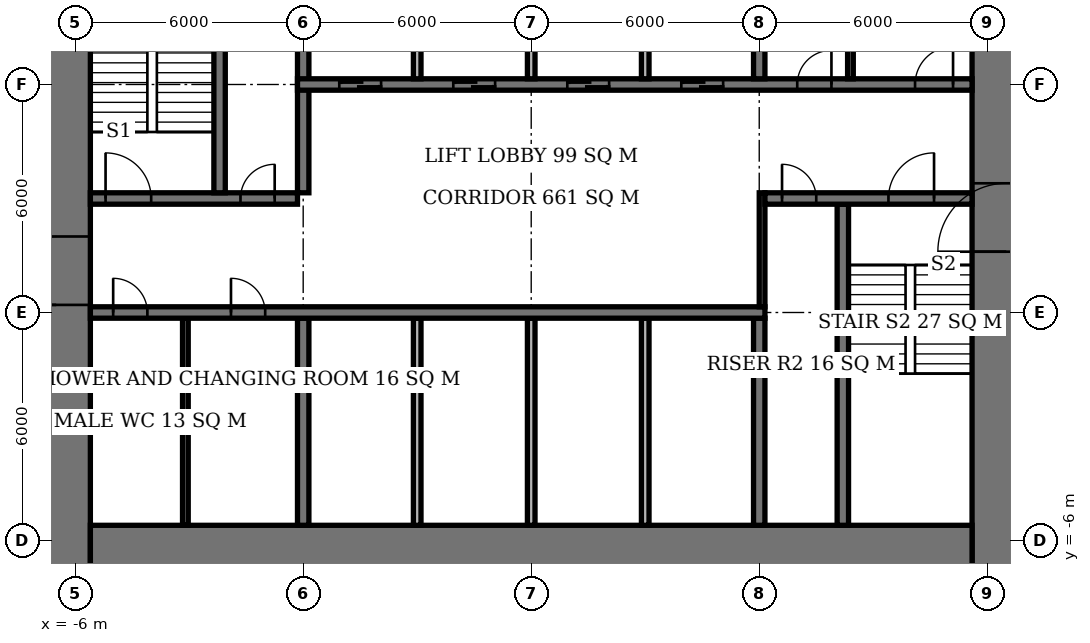
"""IFC4 building model, lengths in metres.
Left out: names, types, materials, properties, quantities, classifications, styles, units other than length and angle.
Written with IfcOpenShell. Run it as: python <this file> out.ifc"""

import sys

from ifc_helpers import new_model, si_unit, direction, frame, frame_2d, origin, place, context, subcontext, project, spatial, rectangle, extrude, element, fill, save


model = new_model("IFC4")
c1 = context("Model", 3, precision=1e-05, world=origin(), true_north=direction((0.0, 1.0)))
c2 = subcontext(c1, "Body", "Model", "MODEL_VIEW")
j1 = project(units=[si_unit("LENGTHUNIT", "METRE"), si_unit("PLANEANGLEUNIT", "RADIAN")], contexts=[c1])
p1 = place(None, origin())
s1 = spatial("IfcSite", under=j1, at=p1, CompositionType="ELEMENT")
p2 = place(p1, origin())
s2 = spatial("IfcBuilding", under=s1, at=p2, CompositionType="ELEMENT")
p3 = place(p2, frame((0.0, 0.0, 41.6)))
s3 = spatial("IfcBuildingStorey", under=s2, at=p3, CompositionType="ELEMENT", Elevation=41.6)
p4 = place(p3, frame((-5.6, -6.6, 0.0), z_axis=(0.0, 0.0, 1.0), x_axis=(1.0, 0.0, 0.0)))
e1 = element("IfcWall", 1, at=p4, inside=s3, PredefinedType="SHEAR", context=c2, shape_type="SweptSolid", body=[
    extrude(rectangle(XDim=23.2, YDim=2.0, at=frame_2d((11.6, 0.0))), origin(), (0.0, 0.0, 1.0), 3.9),
])
p5 = place(p3, frame((-6.5, -7.6, 0.0), z_axis=(0.0, 0.0, 1.0), x_axis=(0.0, 1.0, 0.0)))
e2 = element("IfcWall", 2, at=p5, inside=s3, PredefinedType="SHEAR", context=c2, shape_type="SweptSolid", body=[
    extrude(rectangle(XDim=21.2, YDim=1.8, at=frame_2d((10.6, 0.0))), origin(), (0.0, 0.0, 1.0), 3.9),
])
p6 = place(p5, frame((7.8, 0.0, 0.0)))
e3 = element("IfcOpeningElement", 3, at=p6, cuts=e2, PredefinedType="OPENING", context=c2, shape_type="SweptSolid", body=[
    extrude(rectangle(XDim=1.8, YDim=2.4, at=frame_2d((0.9, 1.2))), frame((0.0, 0.91, 0.0), z_axis=(0.0, -1.0, 0.0), x_axis=(1.0, 0.0, 0.0)), (0.0, 0.0, 1.0), 1.82),
])
p7 = place(p3, frame((18.5, -7.6, 0.0), z_axis=(0.0, 0.0, 1.0), x_axis=(0.0, 1.0, 0.0)))
e4 = element("IfcWall", 4, at=p7, inside=s3, PredefinedType="SHEAR", context=c2, shape_type="SweptSolid", body=[
    extrude(rectangle(XDim=21.2, YDim=1.8, at=frame_2d((10.6, 0.0))), origin(), (0.0, 0.0, 1.0), 3.9),
])
p8 = place(p7, frame((9.2, 0.0, 0.0)))
e5 = element("IfcOpeningElement", 5, at=p8, cuts=e4, PredefinedType="OPENING", context=c2, shape_type="SweptSolid", body=[
    extrude(rectangle(XDim=1.8, YDim=2.4, at=frame_2d((0.9, 1.2))), frame((0.0, 0.91, 0.0), z_axis=(0.0, -1.0, 0.0), x_axis=(1.0, 0.0, 0.0)), (0.0, 0.0, 1.0), 1.82),
])
p9 = place(p3, frame((-5.6, 0.0, 0.0), z_axis=(0.0, 0.0, 1.0), x_axis=(1.0, 0.0, 0.0)))
e6 = element("IfcWall", 6, at=p9, inside=s3, PredefinedType="SHEAR", context=c2, shape_type="SweptSolid", body=[
    extrude(rectangle(XDim=17.75, YDim=0.3, at=frame_2d((8.875, 0.0))), origin(), (0.0, 0.0, 1.0), 3.9),
])
p10 = place(p9, frame((0.6, 0.0, 0.0)))
e7 = element("IfcOpeningElement", 7, at=p10, cuts=e6, PredefinedType="OPENING", context=c2, shape_type="SweptSolid", body=[
    extrude(rectangle(XDim=0.9, YDim=2.1, at=frame_2d((0.45, 1.05))), frame((0.0, 0.16, 0.0), z_axis=(0.0, -1.0, 0.0), x_axis=(1.0, 0.0, 0.0)), (0.0, 0.0, 1.0), 0.32),
])
p11 = place(p9, frame((3.7, 0.0, 0.0)))
e8 = element("IfcOpeningElement", 8, at=p11, cuts=e6, PredefinedType="OPENING", context=c2, shape_type="SweptSolid", body=[
    extrude(rectangle(XDim=0.9, YDim=2.1, at=frame_2d((0.45, 1.05))), frame((0.0, 0.16, 0.0), z_axis=(0.0, -1.0, 0.0), x_axis=(1.0, 0.0, 0.0)), (0.0, 0.0, 1.0), 0.32),
])
p12 = place(p3, frame((-5.6, 3.0, 0.0), z_axis=(0.0, 0.0, 1.0), x_axis=(1.0, 0.0, 0.0)))
e9 = element("IfcWall", 9, at=p12, inside=s3, PredefinedType="SHEAR", context=c2, shape_type="SweptSolid", body=[
    extrude(rectangle(XDim=5.45, YDim=0.3, at=frame_2d((2.725, 0.0))), origin(), (0.0, 0.0, 1.0), 3.9),
])
p13 = place(p12, frame((0.4, 0.0, 0.0)))
e10 = element("IfcOpeningElement", 10, at=p13, cuts=e9, PredefinedType="OPENING", context=c2, shape_type="SweptSolid", body=[
    extrude(rectangle(XDim=1.2, YDim=2.1, at=frame_2d((0.6, 1.05))), frame((0.0, 0.16, 0.0), z_axis=(0.0, -1.0, 0.0), x_axis=(1.0, 0.0, 0.0)), (0.0, 0.0, 1.0), 0.32),
])
p14 = place(p12, frame((3.95, 0.0, 0.0)))
e11 = element("IfcOpeningElement", 11, at=p14, cuts=e9, PredefinedType="OPENING", context=c2, shape_type="SweptSolid", body=[
    extrude(rectangle(XDim=0.9, YDim=2.1, at=frame_2d((0.45, 1.05))), frame((0.0, 0.16, 0.0), z_axis=(0.0, -1.0, 0.0), x_axis=(1.0, 0.0, 0.0)), (0.0, 0.0, 1.0), 0.32),
])
p15 = place(p3, frame((12.15, 3.0, 0.0), z_axis=(0.0, 0.0, 1.0), x_axis=(1.0, 0.0, 0.0)))
e12 = element("IfcWall", 12, at=p15, inside=s3, PredefinedType="SHEAR", context=c2, shape_type="SweptSolid", body=[
    extrude(rectangle(XDim=5.45, YDim=0.3, at=frame_2d((2.725, 0.0))), origin(), (0.0, 0.0, 1.0), 3.9),
])
p16 = place(p15, frame((3.25, 0.0, 0.0)))
e13 = element("IfcOpeningElement", 13, at=p16, cuts=e12, PredefinedType="OPENING", context=c2, shape_type="SweptSolid", body=[
    extrude(rectangle(XDim=1.2, YDim=2.1, at=frame_2d((0.6, 1.05))), frame((0.0, 0.16, 0.0), z_axis=(0.0, -1.0, 0.0), x_axis=(1.0, 0.0, 0.0)), (0.0, 0.0, 1.0), 0.32),
])
p17 = place(p15, frame((0.45, 0.0, 0.0)))
e14 = element("IfcOpeningElement", 14, at=p17, cuts=e12, PredefinedType="OPENING", context=c2, shape_type="SweptSolid", body=[
    extrude(rectangle(XDim=0.9, YDim=2.1, at=frame_2d((0.45, 1.05))), frame((0.0, 0.16, 0.0), z_axis=(0.0, -1.0, 0.0), x_axis=(1.0, 0.0, 0.0)), (0.0, 0.0, 1.0), 0.32),
])
p18 = place(p3, frame((-0.15, 6.0, 0.0), z_axis=(0.0, 0.0, 1.0), x_axis=(1.0, 0.0, 0.0)))
e15 = element("IfcWall", 15, at=p18, inside=s3, PredefinedType="SHEAR", context=c2, shape_type="SweptSolid", body=[
    extrude(rectangle(XDim=17.75, YDim=0.3, at=frame_2d((8.875, 0.0))), origin(), (0.0, 0.0, 1.0), 3.9),
])
p19 = place(p18, frame((13.15, 0.0, 0.0)))
e16 = element("IfcOpeningElement", 16, at=p19, cuts=e15, PredefinedType="OPENING", context=c2, shape_type="SweptSolid", body=[
    extrude(rectangle(XDim=0.9, YDim=2.1, at=frame_2d((0.45, 1.05))), frame((0.0, 0.16, 0.0), z_axis=(0.0, -1.0, 0.0), x_axis=(1.0, 0.0, 0.0)), (0.0, 0.0, 1.0), 0.32),
])
p20 = place(p18, frame((16.25, 0.0, 0.0)))
e17 = element("IfcOpeningElement", 17, at=p20, cuts=e15, PredefinedType="OPENING", context=c2, shape_type="SweptSolid", body=[
    extrude(rectangle(XDim=1.0, YDim=2.1, at=frame_2d((0.5, 1.05))), frame((0.0, 0.16, 0.0), z_axis=(0.0, -1.0, 0.0), x_axis=(1.0, 0.0, 0.0)), (0.0, 0.0, 1.0), 0.32),
])
p21 = place(p18, frame((1.1, 0.0, 0.0)))
e18 = element("IfcOpeningElement", 18, at=p21, cuts=e15, PredefinedType="OPENING", context=c2, shape_type="SweptSolid", body=[
    extrude(rectangle(XDim=1.1, YDim=2.1, at=frame_2d((0.55, 1.05))), frame((0.0, 0.16, 0.0), z_axis=(0.0, -1.0, 0.0), x_axis=(1.0, 0.0, 0.0)), (0.0, 0.0, 1.0), 0.32),
])
p22 = place(p18, frame((4.1, 0.0, 0.0)))
e19 = element("IfcOpeningElement", 19, at=p22, cuts=e15, PredefinedType="OPENING", context=c2, shape_type="SweptSolid", body=[
    extrude(rectangle(XDim=1.1, YDim=2.1, at=frame_2d((0.55, 1.05))), frame((0.0, 0.16, 0.0), z_axis=(0.0, -1.0, 0.0), x_axis=(1.0, 0.0, 0.0)), (0.0, 0.0, 1.0), 0.32),
])
p23 = place(p18, frame((7.1, 0.0, 0.0)))
e20 = element("IfcOpeningElement", 20, at=p23, cuts=e15, PredefinedType="OPENING", context=c2, shape_type="SweptSolid", body=[
    extrude(rectangle(XDim=1.1, YDim=2.1, at=frame_2d((0.55, 1.05))), frame((0.0, 0.16, 0.0), z_axis=(0.0, -1.0, 0.0), x_axis=(1.0, 0.0, 0.0)), (0.0, 0.0, 1.0), 0.32),
])
p24 = place(p18, frame((10.1, 0.0, 0.0)))
e21 = element("IfcOpeningElement", 21, at=p24, cuts=e15, PredefinedType="OPENING", context=c2, shape_type="SweptSolid", body=[
    extrude(rectangle(XDim=1.1, YDim=2.1, at=frame_2d((0.55, 1.05))), frame((0.0, 0.16, 0.0), z_axis=(0.0, -1.0, 0.0), x_axis=(1.0, 0.0, 0.0)), (0.0, 0.0, 1.0), 0.32),
])
p25 = place(p3, frame((0.0, -5.6, 0.0), z_axis=(0.0, 0.0, 1.0), x_axis=(0.0, 1.0, 0.0)))
e22 = element("IfcWall", 22, at=p25, inside=s3, PredefinedType="SHEAR", context=c2, shape_type="SweptSolid", body=[
    extrude(rectangle(XDim=5.45, YDim=0.3, at=frame_2d((2.725, 0.0))), origin(), (0.0, 0.0, 1.0), 3.9),
])
p26 = place(p3, frame((0.0, 3.15, 0.0), z_axis=(0.0, 0.0, 1.0), x_axis=(0.0, 1.0, 0.0)))
e23 = element("IfcWall", 23, at=p26, inside=s3, PredefinedType="SHEAR", context=c2, shape_type="SweptSolid", body=[
    extrude(rectangle(XDim=8.45, YDim=0.3, at=frame_2d((4.225, 0.0))), origin(), (0.0, 0.0, 1.0), 3.9),
])
for number, where, z_axis, x_axis in (
    (24, (12.0, -5.6, 0.0), (0.0, 0.0, 1.0), (0.0, 1.0, 0.0)),
    (25, (12.0, 6.15, 0.0), (0.0, 0.0, 1.0), (0.0, 1.0, 0.0)),
):
    element("IfcWall", number, at=place(p3, frame(where, z_axis=z_axis, x_axis=x_axis)), inside=s3, PredefinedType="SHEAR", context=c2, shape_type="SweptSolid", body=[
        extrude(rectangle(XDim=5.45, YDim=0.3, at=frame_2d((2.725, 0.0))), origin(), (0.0, 0.0, 1.0), 3.9),
    ])
for number, where, z_axis, x_axis in (
    (26, (-2.2, 3.15, 0.0), (0.0, 0.0, 1.0), (0.0, 1.0, 0.0)),
    (27, (14.2, -5.6, 0.0), (0.0, 0.0, 1.0), (0.0, 1.0, 0.0)),
):
    element("IfcWall", number, at=place(p3, frame(where, z_axis=z_axis, x_axis=x_axis)), inside=s3, PredefinedType="SHEAR", context=c2, shape_type="SweptSolid", body=[
        extrude(rectangle(XDim=8.45, YDim=0.3, at=frame_2d((4.225, 0.0))), origin(), (0.0, 0.0, 1.0), 3.9),
    ])
for number, where, z_axis, x_axis in (
    (28, (3.0, 6.15, 0.0), (0.0, 0.0, 1.0), (0.0, 1.0, 0.0)),
    (29, (6.0, 6.15, 0.0), (0.0, 0.0, 1.0), (0.0, 1.0, 0.0)),
    (30, (9.0, 6.15, 0.0), (0.0, 0.0, 1.0), (0.0, 1.0, 0.0)),
    (31, (3.0, -5.6, 0.0), (0.0, 0.0, 1.0), (0.0, 1.0, 0.0)),
    (32, (6.0, -5.6, 0.0), (0.0, 0.0, 1.0), (0.0, 1.0, 0.0)),
    (33, (9.0, -5.6, 0.0), (0.0, 0.0, 1.0), (0.0, 1.0, 0.0)),
):
    element("IfcWall", number, at=place(p3, frame(where, z_axis=z_axis, x_axis=x_axis)), inside=s3, PredefinedType="SOLIDWALL", context=c2, shape_type="SweptSolid", body=[
        extrude(rectangle(XDim=5.45, YDim=0.2, at=frame_2d((2.725, 0.0))), origin(), (0.0, 0.0, 1.0), 3.9),
    ])
for number, where, z_axis, x_axis in (
    (34, (-3.1, -5.6, 0.0), (0.0, 0.0, 1.0), (0.0, 1.0, 0.0)),
    (35, (14.4, 6.15, 0.0), (0.0, 0.0, 1.0), (0.0, 1.0, 0.0)),
):
    element("IfcWall", number, at=place(p3, frame(where, z_axis=z_axis, x_axis=x_axis)), inside=s3, PredefinedType="PLUMBINGWALL", context=c2, shape_type="SweptSolid", body=[
        extrude(rectangle(XDim=5.45, YDim=0.15, at=frame_2d((2.725, 0.0))), origin(), (0.0, 0.0, 1.0), 3.65),
    ])
p27 = place(p3, frame((12.075, 0.15, 0.0), z_axis=(0.0, 0.0, 1.0), x_axis=(0.0, 1.0, 0.0)))
e36 = element("IfcWall", 36, at=p27, inside=s3, PredefinedType="PARTITIONING", context=c2, shape_type="SweptSolid", body=[
    extrude(rectangle(XDim=3.0, YDim=0.15, at=frame_2d((1.5, 0.0))), origin(), (0.0, 0.0, 1.0), 3.65),
])
p28 = place(p6, origin())
e37 = element("IfcDoor", 37, at=p28, inside=s3, OperationType="DOUBLE_DOOR_SINGLE_SWING", PredefinedType="DOOR", context=c2, shape_type="SweptSolid", body=[
    extrude(rectangle(XDim=1.8, YDim=2.4, at=frame_2d((0.9, 1.2))), frame((0.0, 0.025, 0.0), z_axis=(0.0, -1.0, 0.0), x_axis=(1.0, 0.0, 0.0)), (0.0, 0.0, 1.0), 0.05),
])
fill(e3, e37)
p29 = place(p8, origin())
e38 = element("IfcDoor", 38, at=p29, inside=s3, OperationType="DOUBLE_DOOR_SINGLE_SWING", PredefinedType="DOOR", context=c2, shape_type="SweptSolid", body=[
    extrude(rectangle(XDim=1.8, YDim=2.4, at=frame_2d((0.9, 1.2))), frame((0.0, 0.025, 0.0), z_axis=(0.0, -1.0, 0.0), x_axis=(1.0, 0.0, 0.0)), (0.0, 0.0, 1.0), 0.05),
])
fill(e5, e38)
p30 = place(p13, origin())
e39 = element("IfcDoor", 39, at=p30, inside=s3, OperationType="SINGLE_SWING_LEFT", PredefinedType="DOOR", context=c2, shape_type="SweptSolid", body=[
    extrude(rectangle(XDim=1.2, YDim=2.1, at=frame_2d((0.6, 1.05))), frame((0.0, 0.025, 0.0), z_axis=(0.0, -1.0, 0.0), x_axis=(1.0, 0.0, 0.0)), (0.0, 0.0, 1.0), 0.05),
])
fill(e10, e39)
p31 = place(p14, origin())
e40 = element("IfcDoor", 40, at=p31, inside=s3, OperationType="SINGLE_SWING_RIGHT", PredefinedType="DOOR", context=c2, shape_type="SweptSolid", body=[
    extrude(rectangle(XDim=0.9, YDim=2.1, at=frame_2d((0.45, 1.05))), frame((0.0, 0.025, 0.0), z_axis=(0.0, -1.0, 0.0), x_axis=(1.0, 0.0, 0.0)), (0.0, 0.0, 1.0), 0.05),
])
fill(e11, e40)
p32 = place(p16, origin())
e41 = element("IfcDoor", 41, at=p32, inside=s3, OperationType="SINGLE_SWING_RIGHT", PredefinedType="DOOR", context=c2, shape_type="SweptSolid", body=[
    extrude(rectangle(XDim=1.2, YDim=2.1, at=frame_2d((0.6, 1.05))), frame((0.0, 0.025, 0.0), z_axis=(0.0, -1.0, 0.0), x_axis=(1.0, 0.0, 0.0)), (0.0, 0.0, 1.0), 0.05),
])
fill(e13, e41)
p33 = place(p17, origin())
e42 = element("IfcDoor", 42, at=p33, inside=s3, OperationType="SINGLE_SWING_LEFT", PredefinedType="DOOR", context=c2, shape_type="SweptSolid", body=[
    extrude(rectangle(XDim=0.9, YDim=2.1, at=frame_2d((0.45, 1.05))), frame((0.0, 0.025, 0.0), z_axis=(0.0, -1.0, 0.0), x_axis=(1.0, 0.0, 0.0)), (0.0, 0.0, 1.0), 0.05),
])
fill(e14, e42)
p34 = place(p10, origin())
e43 = element("IfcDoor", 43, at=p34, inside=s3, OperationType="SINGLE_SWING_LEFT", PredefinedType="DOOR", context=c2, shape_type="SweptSolid", body=[
    extrude(rectangle(XDim=0.9, YDim=2.1, at=frame_2d((0.45, 1.05))), frame((0.0, 0.025, 0.0), z_axis=(0.0, -1.0, 0.0), x_axis=(1.0, 0.0, 0.0)), (0.0, 0.0, 1.0), 0.05),
])
fill(e7, e43)
p35 = place(p11, origin())
e44 = element("IfcDoor", 44, at=p35, inside=s3, OperationType="SINGLE_SWING_LEFT", PredefinedType="DOOR", context=c2, shape_type="SweptSolid", body=[
    extrude(rectangle(XDim=0.9, YDim=2.1, at=frame_2d((0.45, 1.05))), frame((0.0, 0.025, 0.0), z_axis=(0.0, -1.0, 0.0), x_axis=(1.0, 0.0, 0.0)), (0.0, 0.0, 1.0), 0.05),
])
fill(e8, e44)
p36 = place(p19, origin())
e45 = element("IfcDoor", 45, at=p36, inside=s3, OperationType="SINGLE_SWING_RIGHT", PredefinedType="DOOR", context=c2, shape_type="SweptSolid", body=[
    extrude(rectangle(XDim=0.9, YDim=2.1, at=frame_2d((0.45, 1.05))), frame((0.0, 0.025, 0.0), z_axis=(0.0, -1.0, 0.0), x_axis=(1.0, 0.0, 0.0)), (0.0, 0.0, 1.0), 0.05),
])
fill(e16, e45)
p37 = place(p20, origin())
e46 = element("IfcDoor", 46, at=p37, inside=s3, OperationType="SINGLE_SWING_RIGHT", PredefinedType="DOOR", context=c2, shape_type="SweptSolid", body=[
    extrude(rectangle(XDim=1.0, YDim=2.1, at=frame_2d((0.5, 1.05))), frame((0.0, 0.025, 0.0), z_axis=(0.0, -1.0, 0.0), x_axis=(1.0, 0.0, 0.0)), (0.0, 0.0, 1.0), 0.05),
])
fill(e17, e46)
p38 = place(p21, origin())
e47 = element("IfcDoor", 47, at=p38, inside=s3, OperationType="DOUBLE_DOOR_SLIDING", PredefinedType="USERDEFINED", context=c2, shape_type="SweptSolid", body=[
    extrude(rectangle(XDim=1.1, YDim=2.1, at=frame_2d((0.55, 1.05))), frame((0.0, 0.025, 0.0), z_axis=(0.0, -1.0, 0.0), x_axis=(1.0, 0.0, 0.0)), (0.0, 0.0, 1.0), 0.05),
])
fill(e18, e47)
p39 = place(p22, origin())
e48 = element("IfcDoor", 48, at=p39, inside=s3, OperationType="DOUBLE_DOOR_SLIDING", PredefinedType="USERDEFINED", context=c2, shape_type="SweptSolid", body=[
    extrude(rectangle(XDim=1.1, YDim=2.1, at=frame_2d((0.55, 1.05))), frame((0.0, 0.025, 0.0), z_axis=(0.0, -1.0, 0.0), x_axis=(1.0, 0.0, 0.0)), (0.0, 0.0, 1.0), 0.05),
])
fill(e19, e48)
p40 = place(p23, origin())
e49 = element("IfcDoor", 49, at=p40, inside=s3, OperationType="DOUBLE_DOOR_SLIDING", PredefinedType="USERDEFINED", context=c2, shape_type="SweptSolid", body=[
    extrude(rectangle(XDim=1.1, YDim=2.1, at=frame_2d((0.55, 1.05))), frame((0.0, 0.025, 0.0), z_axis=(0.0, -1.0, 0.0), x_axis=(1.0, 0.0, 0.0)), (0.0, 0.0, 1.0), 0.05),
])
fill(e20, e49)
p41 = place(p24, origin())
e50 = element("IfcDoor", 50, at=p41, inside=s3, OperationType="DOUBLE_DOOR_SLIDING", PredefinedType="USERDEFINED", context=c2, shape_type="SweptSolid", body=[
    extrude(rectangle(XDim=1.1, YDim=2.1, at=frame_2d((0.55, 1.05))), frame((0.0, 0.025, 0.0), z_axis=(0.0, -1.0, 0.0), x_axis=(1.0, 0.0, 0.0)), (0.0, 0.0, 1.0), 0.05),
])
fill(e21, e50)
save(model, sys.argv[1])
